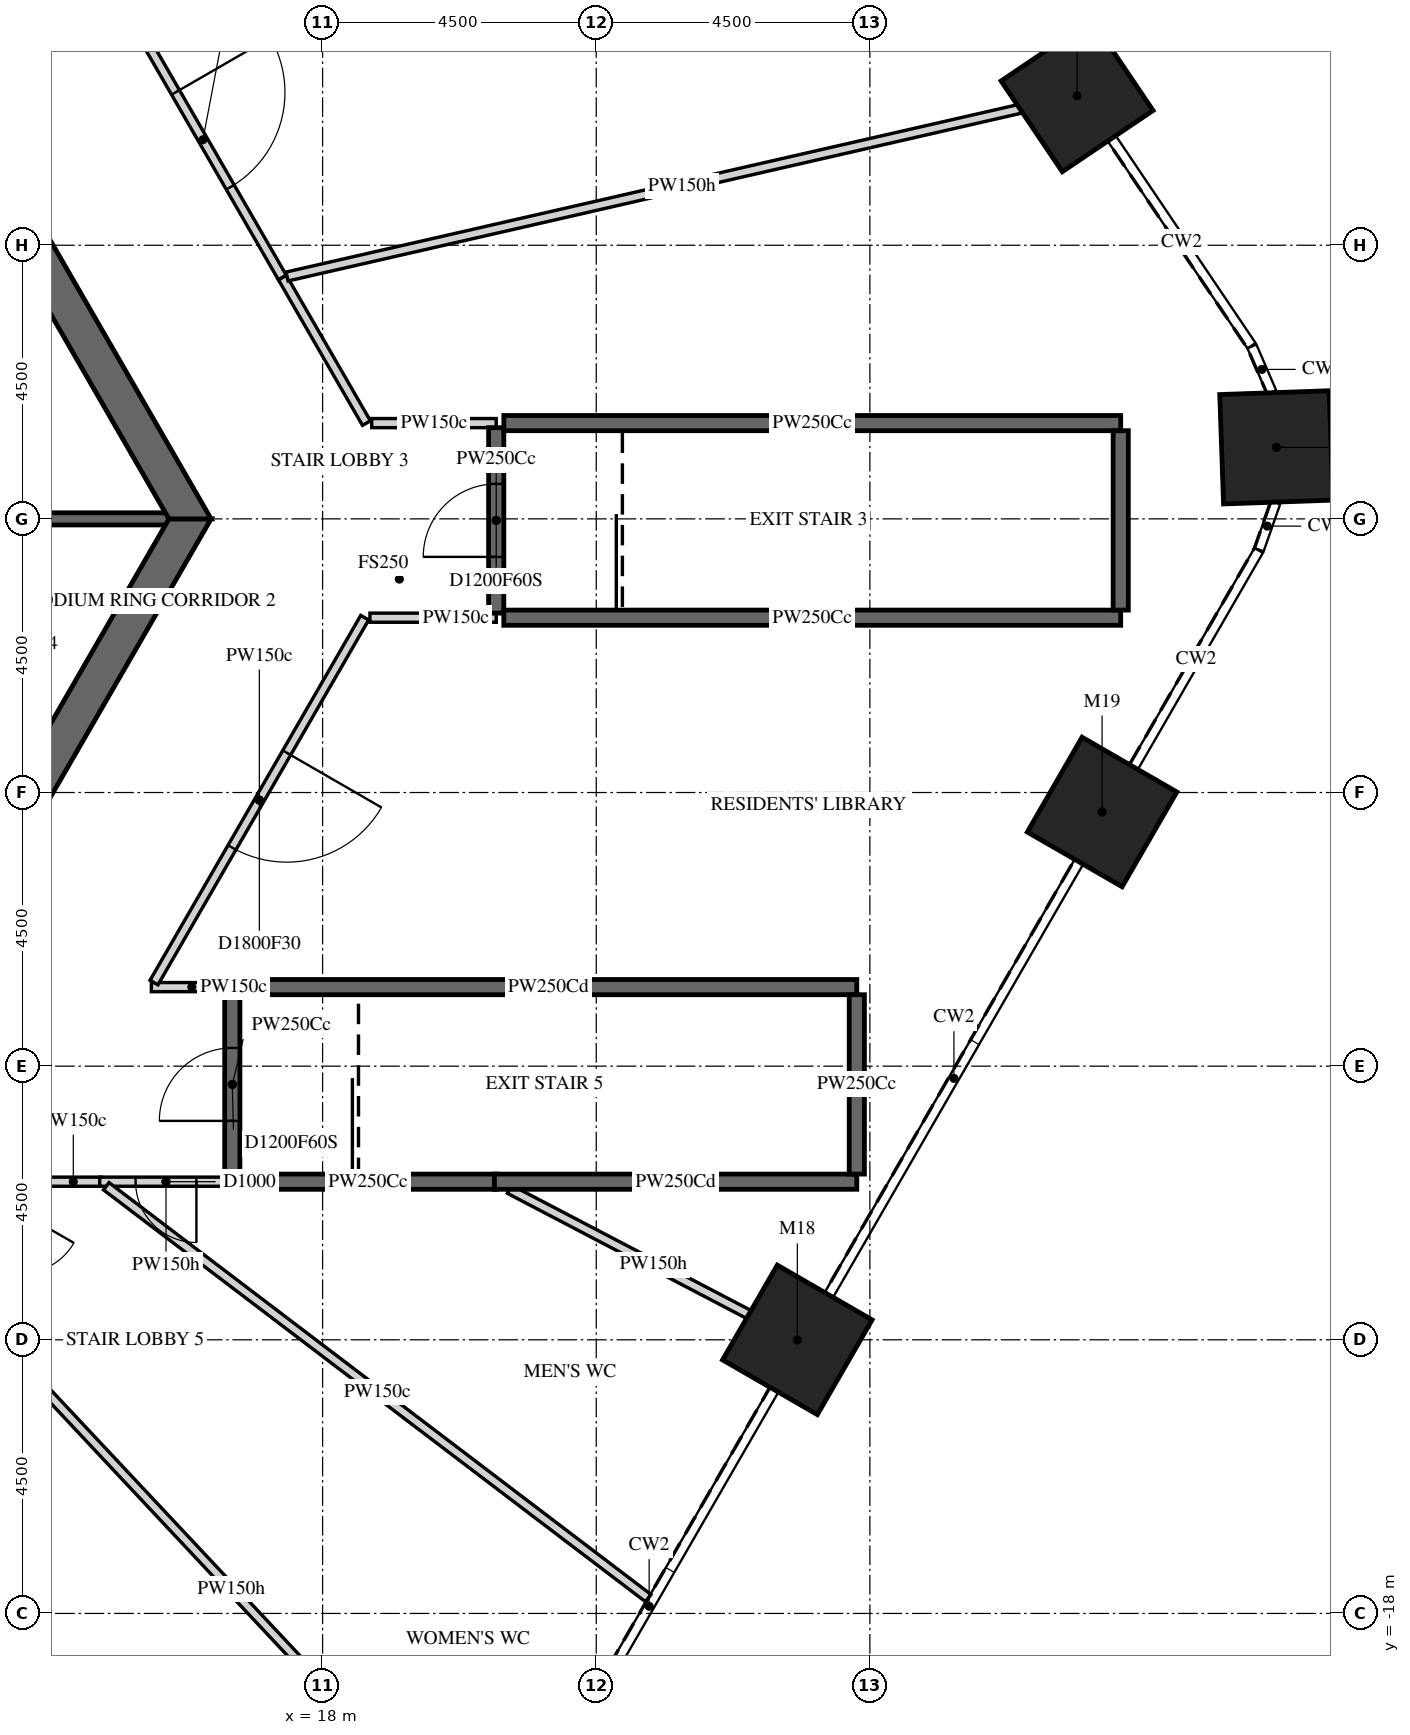
"""IFC4 building model, lengths in metres.
Left out: names, types, materials, properties, quantities, classifications, styles, units other than length and angle.
Written with IfcOpenShell. Run it as: python <this file> out.ifc"""

import sys

from ifc_helpers import new_model, si_unit, direction, frame, frame_2d, origin, origin_2d, place, context, subcontext, project, spatial, polyline, rectangle, outline, extrude, element, fill, save


model = new_model("IFC4")
c1 = context("Model", 3, precision=1e-05, world=origin(), true_north=direction((0.0, 1.0)))
c2 = subcontext(c1, "Body", "Model", "MODEL_VIEW")
j1 = project(units=[si_unit("LENGTHUNIT", "METRE"), si_unit("PLANEANGLEUNIT", "RADIAN")], contexts=[c1])
p1 = place(None, origin())
s1 = spatial("IfcSite", under=j1, at=p1, CompositionType="ELEMENT")
p2 = place(p1, origin())
s2 = spatial("IfcBuilding", under=s1, at=p2, CompositionType="ELEMENT")
p3 = place(p2, frame((0.0, 0.0, 26.0)))
s3 = spatial("IfcBuildingStorey", under=s2, at=p3, CompositionType="ELEMENT", Elevation=26.0)
for number, where, z_axis, x_axis in (
    (1, (25.807, -13.501, -0.25), (0.0, 0.0, 1.0), (-0.5, -0.866, 0.0)),
    (2, (30.819, -4.82, -0.25), (0.0, 0.0, 1.0), (-0.5, -0.866, 0.0)),
    (3, (33.685, 1.176, -0.25), (0.0, 0.0, 1.0), (0.035, -0.999, 0.0)),
    (4, (30.407, 6.958, -0.25), (0.0, 0.0, 1.0), (0.559, -0.829, 0.0)),
):
    element("IfcColumn", number, at=place(p3, frame(where, z_axis=z_axis, x_axis=x_axis)), inside=s3, PredefinedType="COLUMN", context=c2, shape_type="SweptSolid", body=[
        extrude(rectangle(XDim=1.8, YDim=1.8, at=origin_2d()), origin(), (0.0, 0.0, 1.0), 5.45),
    ])
p4 = place(p3, frame((7.91, -13.7, -0.25), z_axis=(0.0, 0.0, 1.0), x_axis=(0.499999880136, 0.866025472988, 0.0)))
e5 = element("IfcWall", 5, at=p4, inside=s3, PredefinedType="SHEAR", context=c2, shape_type="SweptSolid", body=[
    extrude(outline(polyline([(-0.173, -0.3), (15.993, -0.3), (15.646, 0.3), (0.173, 0.3), (-0.173, -0.3)])), origin(), (0.0, 0.0, 1.0), 5.45),
])
p5 = place(p4, frame((7.039, 0.0, 0.25)))
e6 = element("IfcOpeningElement", 6, at=p5, cuts=e5, PredefinedType="OPENING", context=c2, shape_type="SweptSolid", body=[
    extrude(rectangle(XDim=1.8, YDim=2.4, at=frame_2d((0.9, 1.2))), frame((0.0, 0.31, 0.0), z_axis=(0.0, -1.0, 0.0), x_axis=(1.0, 0.0, 0.0)), (0.0, 0.0, 1.0), 0.62),
])
p6 = place(p3, frame((15.819, 0.0, -0.25), z_axis=(0.0, 0.0, 1.0), x_axis=(-0.499999880136, 0.866025472988, 0.0)))
e7 = element("IfcWall", 7, at=p6, inside=s3, PredefinedType="SHEAR", context=c2, shape_type="SweptSolid", body=[
    extrude(outline(polyline([(-0.173, -0.3), (15.993, -0.3), (15.646, 0.3), (0.173, 0.3), (-0.173, -0.3)])), origin(), (0.0, 0.0, 1.0), 5.45),
])
p7 = place(p6, frame((6.981, 0.0, 0.25)))
e8 = element("IfcOpeningElement", 8, at=p7, cuts=e7, PredefinedType="OPENING", context=c2, shape_type="SweptSolid", body=[
    extrude(rectangle(XDim=1.8, YDim=2.4, at=frame_2d((0.9, 1.2))), frame((0.0, 0.31, 0.0), z_axis=(0.0, -1.0, 0.0), x_axis=(1.0, 0.0, 0.0)), (0.0, 0.0, 1.0), 0.62),
])
p8 = place(p3, frame((11.547, 0.0, -0.25), z_axis=(0.0, 0.0, 1.0), x_axis=(1.0, 0.0, 0.0)))
e9 = element("IfcWall", 9, at=p8, inside=s3, PredefinedType="SHEAR", context=c2, shape_type="SweptSolid", body=[
    extrude(rectangle(XDim=3.926, YDim=0.2, at=frame_2d((1.963, 0.0))), origin(), (0.0, 0.0, 1.0), 5.45),
])
p9 = place(p3, frame((14.36, -10.9, 0.0), z_axis=(0.0, 0.0, 1.0), x_axis=(-1.0, 0.0, 0.0)))
e10 = element("IfcWall", 10, at=p9, inside=s3, PredefinedType="PARTITIONING", context=c2, shape_type="SweptSolid", body=[
    extrude(rectangle(XDim=0.92, YDim=0.15, at=frame_2d((0.46, 0.0))), origin(), (0.0, 0.0, 1.0), 5.2),
])
p10 = place(p3, frame((15.184, -7.7, 0.0), z_axis=(0.0, 0.0, 1.0), x_axis=(1.0, 0.0, 0.0)))
e11 = element("IfcWall", 11, at=p10, inside=s3, PredefinedType="PARTITIONING", context=c2, shape_type="SweptSolid", body=[
    extrude(rectangle(XDim=1.331, YDim=0.15, at=frame_2d((0.666, 0.0))), origin(), (0.0, 0.0, 1.0), 5.2),
])
p11 = place(p3, frame((18.692, -1.625, 0.0), z_axis=(0.0, 0.0, 1.0), x_axis=(-0.500053906551, -0.865994278585, 0.0)))
e12 = element("IfcWall", 12, at=p11, inside=s3, PredefinedType="PARTITIONING", context=c2, shape_type="SweptSolid", body=[
    extrude(rectangle(XDim=6.928, YDim=0.15, at=frame_2d((3.464, 0.0))), origin(), (0.0, 0.0, 1.0), 5.2),
])
p12 = place(p11, frame((2.564, 0.0, 0.0)))
e13 = element("IfcOpeningElement", 13, at=p12, cuts=e12, PredefinedType="OPENING", context=c2, shape_type="SweptSolid", body=[
    extrude(rectangle(XDim=1.8, YDim=2.1, at=frame_2d((0.9, 1.05))), frame((0.0, 0.085, 0.0), z_axis=(0.0, -1.0, 0.0), x_axis=(1.0, 0.0, 0.0)), (0.0, 0.0, 1.0), 0.17),
])
p13 = place(p3, frame((16.515, -10.9, 0.0), z_axis=(0.0, 0.0, 1.0), x_axis=(-1.0, 0.0, 0.0)))
e14 = element("IfcWall", 14, at=p13, inside=s3, PredefinedType="PARTITIONING", context=c2, shape_type="SweptSolid", body=[
    extrude(rectangle(XDim=2.181, YDim=0.15, at=frame_2d((1.09, 0.0))), origin(), (0.0, 0.0, 1.0), 4.273),
])
p14 = place(p13, frame((0.591, 0.0, 0.0)))
e15 = element("IfcOpeningElement", 15, at=p14, cuts=e14, PredefinedType="OPENING", context=c2, shape_type="SweptSolid", body=[
    extrude(rectangle(XDim=1.0, YDim=2.1, at=frame_2d((0.5, 1.05))), frame((0.0, 0.085, 0.0), z_axis=(0.0, -1.0, 0.0), x_axis=(1.0, 0.0, 0.0)), (0.0, 0.0, 1.0), 0.17),
])
p15 = place(p3, frame((16.515, -10.825, 0.0), z_axis=(0.0, 0.0, 1.0), x_axis=(0.0, 1.0, 0.0)))
e16 = element("IfcWall", 16, at=p15, inside=s3, PredefinedType="PARTITIONING", context=c2, shape_type="SweptSolid", body=[
    extrude(rectangle(XDim=3.05, YDim=0.25, at=frame_2d((1.525, 0.0))), origin(), (0.0, 0.0, 1.0), 5.2),
])
p16 = place(p15, frame((0.925, 0.0, 0.0)))
e17 = element("IfcOpeningElement", 17, at=p16, cuts=e16, PredefinedType="OPENING", context=c2, shape_type="SweptSolid", body=[
    extrude(rectangle(XDim=1.2, YDim=2.1, at=frame_2d((0.6, 1.05))), frame((0.0, 0.135, 0.0), z_axis=(0.0, -1.0, 0.0), x_axis=(1.0, 0.0, 0.0)), (0.0, 0.0, 1.0), 0.27),
])
p17 = place(p3, frame((16.64, -7.7, 0.0), z_axis=(0.0, 0.0, 1.0), x_axis=(1.0, 0.0, 0.0)))
e18 = element("IfcWall", 18, at=p17, inside=s3, PredefinedType="PARTITIONING", context=c2, shape_type="SweptSolid", body=[
    extrude(rectangle(XDim=10.145, YDim=0.25, at=frame_2d((5.073, 0.0))), origin(), (0.0, 0.0, 1.0), 4.273),
])
p18 = place(p3, frame((14.723, 8.5, 0.0), z_axis=(0.0, 0.0, 1.0), x_axis=(0.499952654668, -0.866052736899, 0.0)))
e19 = element("IfcWall", 19, at=p18, inside=s3, PredefinedType="PARTITIONING", context=c2, shape_type="SweptSolid", body=[
    extrude(rectangle(XDim=5.233, YDim=0.15, at=frame_2d((2.616, 0.0))), origin(), (0.0, 0.0, 1.0), 5.2),
])
p19 = place(p18, frame((1.716, 0.0, 0.0)))
e20 = element("IfcOpeningElement", 20, at=p19, cuts=e19, PredefinedType="OPENING", context=c2, shape_type="SweptSolid", body=[
    extrude(rectangle(XDim=1.8, YDim=2.1, at=frame_2d((0.9, 1.05))), frame((0.0, 0.085, 0.0), z_axis=(0.0, -1.0, 0.0), x_axis=(1.0, 0.0, 0.0)), (0.0, 0.0, 1.0), 0.17),
])
p20 = place(p3, frame((18.721, 1.575, 0.0), z_axis=(0.0, 0.0, 1.0), x_axis=(-0.500053847239, 0.865994312834, 0.0)))
e21 = element("IfcWall", 21, at=p20, inside=s3, PredefinedType="PARTITIONING", context=c2, shape_type="SweptSolid", body=[
    extrude(rectangle(XDim=2.763, YDim=0.15, at=frame_2d((1.382, 0.0))), origin(), (0.0, 0.0, 1.0), 5.2),
])
p21 = place(p3, frame((18.808, 1.575, 0.0), z_axis=(0.0, 0.0, 1.0), x_axis=(1.0, 0.0, 0.0)))
e22 = element("IfcWall", 22, at=p21, inside=s3, PredefinedType="PARTITIONING", context=c2, shape_type="SweptSolid", body=[
    extrude(rectangle(XDim=2.047, YDim=0.15, at=frame_2d((1.024, 0.0))), origin(), (0.0, 0.0, 1.0), 5.2),
])
p22 = place(p3, frame((20.795, -22.182, 0.0), z_axis=(0.0, 0.0, 1.0), x_axis=(-0.683955995382, 0.729523266511, 0.0)))
e23 = element("IfcWall", 23, at=p22, inside=s3, PredefinedType="PARTITIONING", context=c2, shape_type="SweptSolid", body=[
    extrude(rectangle(XDim=12.564, YDim=0.15, at=frame_2d((6.282, 0.0))), origin(), (0.0, 0.0, 1.0), 4.273),
])
p23 = place(p3, frame((20.855, -1.625, 0.0), z_axis=(0.0, 0.0, 1.0), x_axis=(-1.0, 0.0, 0.0)))
e24 = element("IfcWall", 24, at=p23, inside=s3, PredefinedType="PARTITIONING", context=c2, shape_type="SweptSolid", body=[
    extrude(rectangle(XDim=2.076, YDim=0.15, at=frame_2d((1.038, 0.0))), origin(), (0.0, 0.0, 1.0), 5.2),
])
p24 = place(p3, frame((20.855, -1.55, 0.0), z_axis=(0.0, 0.0, 1.0), x_axis=(0.0, 1.0, 0.0)))
e25 = element("IfcWall", 25, at=p24, inside=s3, PredefinedType="PARTITIONING", context=c2, shape_type="SweptSolid", body=[
    extrude(rectangle(XDim=3.05, YDim=0.25, at=frame_2d((1.525, 0.0))), origin(), (0.0, 0.0, 1.0), 5.2),
])
p25 = place(p24, frame((0.925, 0.0, 0.0)))
e26 = element("IfcOpeningElement", 26, at=p25, cuts=e25, PredefinedType="OPENING", context=c2, shape_type="SweptSolid", body=[
    extrude(rectangle(XDim=1.2, YDim=2.1, at=frame_2d((0.6, 1.05))), frame((0.0, 0.135, 0.0), z_axis=(0.0, -1.0, 0.0), x_axis=(1.0, 0.0, 0.0)), (0.0, 0.0, 1.0), 0.27),
])
p26 = place(p3, frame((20.98, 1.575, 0.0), z_axis=(0.0, 0.0, 1.0), x_axis=(1.0, 0.0, 0.0)))
e27 = element("IfcWall", 27, at=p26, inside=s3, PredefinedType="PARTITIONING", context=c2, shape_type="SweptSolid", body=[
    extrude(rectangle(XDim=10.145, YDim=0.25, at=frame_2d((5.073, 0.0))), origin(), (0.0, 0.0, 1.0), 5.2),
])
p27 = place(p3, frame((20.856, -10.9, 0.0), z_axis=(0.0, 0.0, 1.0), x_axis=(-1.0, 0.0, 0.0)))
e28 = element("IfcWall", 28, at=p27, inside=s3, PredefinedType="PARTITIONING", context=c2, shape_type="SweptSolid", body=[
    extrude(rectangle(XDim=4.216, YDim=0.25, at=frame_2d((2.108, 0.0))), origin(), (0.0, 0.0, 1.0), 5.2),
])
p28 = place(p3, frame((23.355, -17.748, 0.0), z_axis=(0.0, 0.0, 1.0), x_axis=(-0.796181106224, 0.605058382383, 0.0)))
e29 = element("IfcWall", 29, at=p28, inside=s3, PredefinedType="PARTITIONING", context=c2, shape_type="SweptSolid", body=[
    extrude(rectangle(XDim=11.194, YDim=0.15, at=frame_2d((5.597, 0.0))), origin(), (0.0, 0.0, 1.0), 5.2),
])
p29 = place(p3, frame((25.807, -13.501, 0.0), z_axis=(0.0, 0.0, 1.0), x_axis=(-0.886067598261, 0.463556049807, 0.0)))
e30 = element("IfcWall", 30, at=p29, inside=s3, PredefinedType="PARTITIONING", context=c2, shape_type="SweptSolid", body=[
    extrude(rectangle(XDim=5.342, YDim=0.15, at=frame_2d((2.671, 0.0))), origin(), (0.0, 0.0, 1.0), 4.273),
])
p30 = place(p3, frame((26.785, -10.9, 0.0), z_axis=(0.0, 0.0, 1.0), x_axis=(-1.0, 0.0, 0.0)))
e31 = element("IfcWall", 31, at=p30, inside=s3, PredefinedType="PARTITIONING", context=c2, shape_type="SweptSolid", body=[
    extrude(rectangle(XDim=5.96, YDim=0.25, at=frame_2d((2.98, 0.0))), origin(), (0.0, 0.0, 1.0), 4.273),
])
p31 = place(p3, frame((26.785, -7.825, 0.0), z_axis=(0.0, 0.0, 1.0), x_axis=(0.0, -1.0, 0.0)))
e32 = element("IfcWall", 32, at=p31, inside=s3, PredefinedType="PARTITIONING", context=c2, shape_type="SweptSolid", body=[
    extrude(rectangle(XDim=2.95, YDim=0.25, at=frame_2d((1.475, 0.0))), origin(), (0.0, 0.0, 1.0), 5.2),
])
p32 = place(p3, frame((30.407, 6.958, 0.0), z_axis=(0.0, 0.0, 1.0), x_axis=(-0.974810618682, -0.223034207477, 0.0)))
e33 = element("IfcWall", 33, at=p32, inside=s3, PredefinedType="PARTITIONING", context=c2, shape_type="SweptSolid", body=[
    extrude(rectangle(XDim=13.327, YDim=0.15, at=frame_2d((6.664, 0.0))), origin(), (0.0, 0.0, 1.0), 4.273),
])
p33 = place(p3, frame((31.125, -1.625, 0.0), z_axis=(0.0, 0.0, 1.0), x_axis=(-1.0, 0.0, 0.0)))
e34 = element("IfcWall", 34, at=p33, inside=s3, PredefinedType="PARTITIONING", context=c2, shape_type="SweptSolid", body=[
    extrude(rectangle(XDim=10.145, YDim=0.25, at=frame_2d((5.073, 0.0))), origin(), (0.0, 0.0, 1.0), 5.2),
])
p34 = place(p3, frame((31.125, 1.45, 0.0), z_axis=(0.0, 0.0, 1.0), x_axis=(0.0, -1.0, 0.0)))
e35 = element("IfcWall", 35, at=p34, inside=s3, PredefinedType="PARTITIONING", context=c2, shape_type="SweptSolid", body=[
    extrude(rectangle(XDim=2.95, YDim=0.25, at=frame_2d((1.475, 0.0))), origin(), (0.0, 0.0, 1.0), 5.2),
])
p35 = place(p12, origin())
e36 = element("IfcDoor", 36, at=p35, inside=s3, OperationType="DOUBLE_DOOR_SINGLE_SWING", PredefinedType="DOOR", context=c2, shape_type="SweptSolid", body=[
    extrude(rectangle(XDim=1.8, YDim=2.1, at=frame_2d((0.9, 1.05))), frame((0.0, 0.025, 0.0), z_axis=(0.0, -1.0, 0.0), x_axis=(1.0, 0.0, 0.0)), (0.0, 0.0, 1.0), 0.05),
])
fill(e13, e36)
p36 = place(p14, origin())
e37 = element("IfcDoor", 37, at=p36, inside=s3, OperationType="SINGLE_SWING_RIGHT", PredefinedType="DOOR", context=c2, shape_type="SweptSolid", body=[
    extrude(rectangle(XDim=1.0, YDim=2.1, at=frame_2d((0.5, 1.05))), frame((0.0, 0.025, 0.0), z_axis=(0.0, -1.0, 0.0), x_axis=(1.0, 0.0, 0.0)), (0.0, 0.0, 1.0), 0.05),
])
fill(e15, e37)
p37 = place(p16, origin())
e38 = element("IfcDoor", 38, at=p37, inside=s3, OperationType="SINGLE_SWING_LEFT", PredefinedType="DOOR", context=c2, shape_type="SweptSolid", body=[
    extrude(rectangle(XDim=1.2, YDim=2.1, at=frame_2d((0.6, 1.05))), frame((0.0, 0.025, 0.0), z_axis=(0.0, -1.0, 0.0), x_axis=(1.0, 0.0, 0.0)), (0.0, 0.0, 1.0), 0.05),
])
fill(e17, e38)
p38 = place(p19, origin())
e39 = element("IfcDoor", 39, at=p38, inside=s3, OperationType="DOUBLE_DOOR_SINGLE_SWING", PredefinedType="DOOR", context=c2, shape_type="SweptSolid", body=[
    extrude(rectangle(XDim=1.8, YDim=2.1, at=frame_2d((0.9, 1.05))), frame((0.0, 0.025, 0.0), z_axis=(0.0, -1.0, 0.0), x_axis=(1.0, 0.0, 0.0)), (0.0, 0.0, 1.0), 0.05),
])
fill(e20, e39)
p39 = place(p25, origin())
e40 = element("IfcDoor", 40, at=p39, inside=s3, OperationType="SINGLE_SWING_LEFT", PredefinedType="DOOR", context=c2, shape_type="SweptSolid", body=[
    extrude(rectangle(XDim=1.2, YDim=2.1, at=frame_2d((0.6, 1.05))), frame((0.0, 0.025, 0.0), z_axis=(0.0, -1.0, 0.0), x_axis=(1.0, 0.0, 0.0)), (0.0, 0.0, 1.0), 0.05),
])
fill(e26, e40)
save(model, sys.argv[1])
